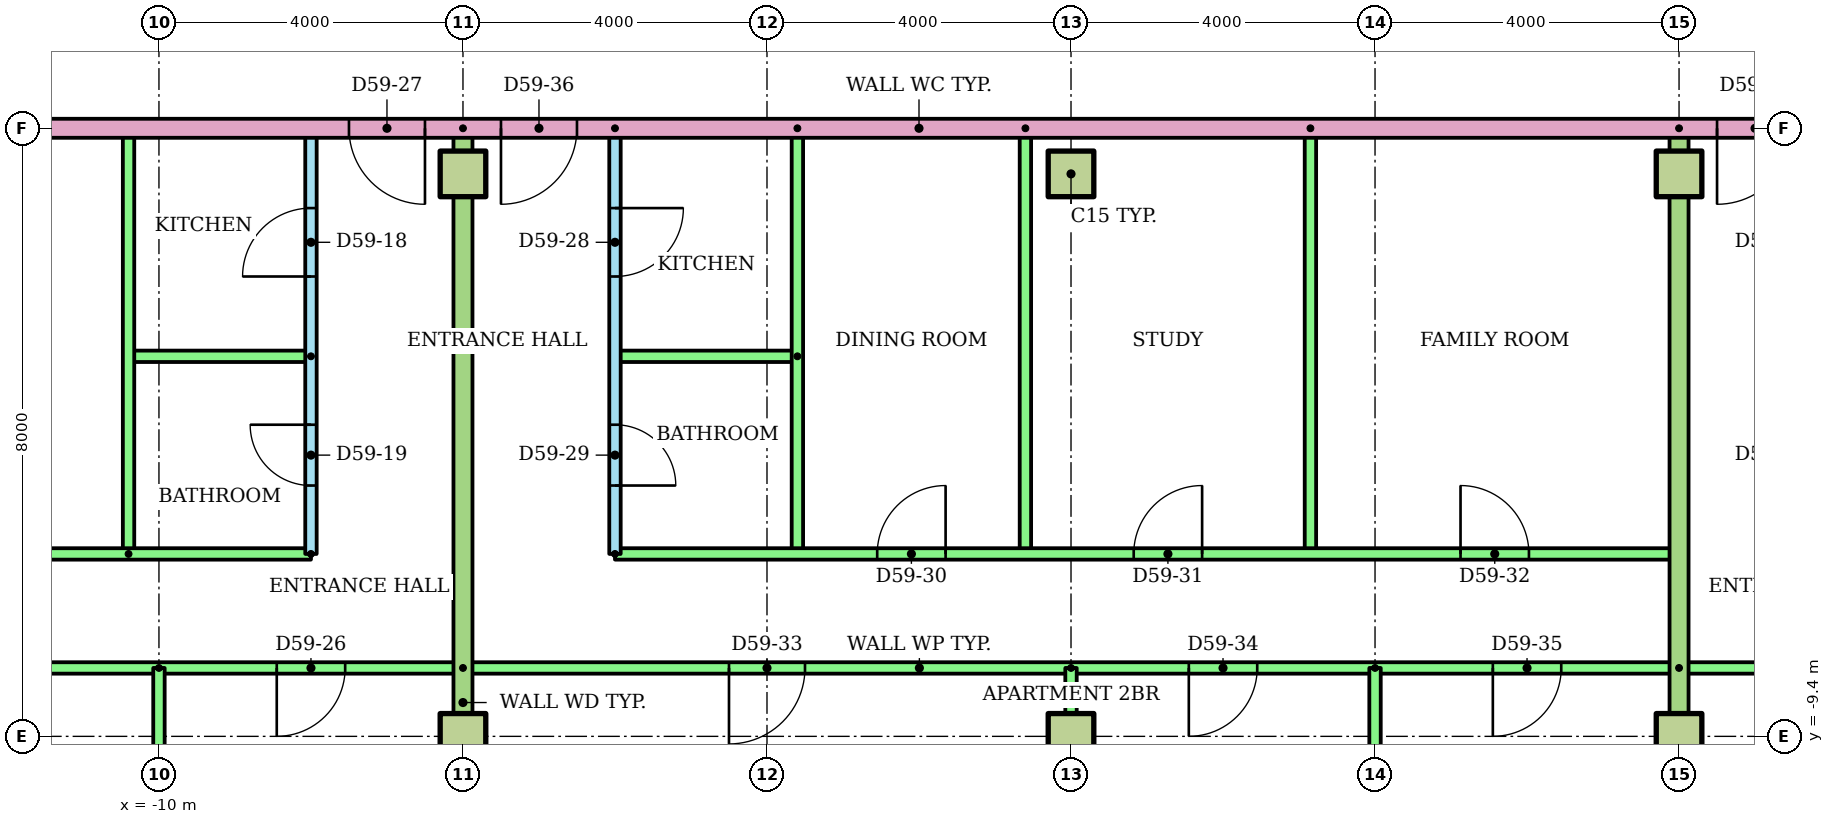
"""IFC4 building model, lengths in metres.
Left out: names, types, materials, properties, quantities, classifications, styles, units other than length and angle.
Written with IfcOpenShell. Run it as: python <this file> out.ifc"""

import sys

from ifc_helpers import new_model, si_unit, direction, frame, frame_2d, origin, origin_2d, place, context, subcontext, project, spatial, rectangle, extrude, element, fill, save


model = new_model("IFC4")
c1 = context("Model", 3, precision=1e-05, world=origin(), true_north=direction((0.0, 1.0)))
c2 = subcontext(c1, "Body", "Model", "MODEL_VIEW")
j1 = project(units=[si_unit("LENGTHUNIT", "METRE"), si_unit("PLANEANGLEUNIT", "RADIAN")], contexts=[c1])
p1 = place(None, origin())
s1 = spatial("IfcSite", under=j1, at=p1, CompositionType="ELEMENT")
p2 = place(p1, origin())
s2 = spatial("IfcBuilding", under=s1, at=p2, CompositionType="ELEMENT")
p3 = place(p2, frame((0.0, 0.0, 226.8)))
s3 = spatial("IfcBuildingStorey", under=s2, at=p3, CompositionType="ELEMENT", Elevation=226.8)
for number, where in (
    (1, (-6.0, -9.4, 0.0)),
    (2, (2.0, -9.4, 0.0)),
    (3, (10.0, -9.4, 0.0)),
    (4, (-6.0, -2.0, 0.0)),
    (5, (2.0, -2.0, 0.0)),
    (6, (10.0, -2.0, 0.0)),
):
    element("IfcColumn", number, at=place(p3, frame(where)), inside=s3, PredefinedType="COLUMN", context=c2, shape_type="SweptSolid", body=[
        extrude(rectangle(XDim=0.6, YDim=0.6, at=origin_2d()), origin(), (0.0, 0.0, 1.0), 3.2),
    ])
p4 = place(p3, frame((-8.0, -7.0, 0.0), z_axis=(0.0, 0.0, 1.0), x_axis=(0.0, 1.0, 0.0)))
e7 = element("IfcWall", 7, at=p4, inside=s3, PredefinedType="PARTITIONING", context=c2, shape_type="SweptSolid", body=[
    extrude(rectangle(XDim=5.6, YDim=0.15, at=frame_2d((2.8, 0.0))), origin(), (0.0, 0.0, 1.0), 2.4),
])
p5 = place(p4, frame((3.65, 0.0, 0.0)))
e8 = element("IfcOpeningElement", 8, at=p5, cuts=e7, PredefinedType="OPENING", context=c2, shape_type="SweptSolid", body=[
    extrude(rectangle(XDim=0.9, YDim=2.1, at=frame_2d((0.45, 1.05))), frame((0.0, 0.085, 0.0), z_axis=(0.0, -1.0, 0.0), x_axis=(1.0, 0.0, 0.0)), (0.0, 0.0, 1.0), 0.17),
])
p6 = place(p4, frame((0.9, 0.0, 0.0)))
e9 = element("IfcOpeningElement", 9, at=p6, cuts=e7, PredefinedType="OPENING", context=c2, shape_type="SweptSolid", body=[
    extrude(rectangle(XDim=0.8, YDim=2.1, at=frame_2d((0.4, 1.05))), frame((0.0, 0.085, 0.0), z_axis=(0.0, -1.0, 0.0), x_axis=(1.0, 0.0, 0.0)), (0.0, 0.0, 1.0), 0.17),
])
p7 = place(p3, frame((-8.0, -4.4, 0.0), z_axis=(0.0, 0.0, 1.0), x_axis=(-1.0, 0.0, 0.0)))
e10 = element("IfcWall", 10, at=p7, inside=s3, PredefinedType="PARTITIONING", context=c2, shape_type="SweptSolid", body=[
    extrude(rectangle(XDim=2.4, YDim=0.15, at=frame_2d((1.2, 0.0))), origin(), (0.0, 0.0, 1.0), 2.4),
])
p8 = place(p3, frame((-10.4, -7.0, 0.0), z_axis=(0.0, 0.0, 1.0), x_axis=(0.0, 1.0, 0.0)))
e11 = element("IfcWall", 11, at=p8, inside=s3, PredefinedType="PARTITIONING", context=c2, shape_type="SweptSolid", body=[
    extrude(rectangle(XDim=5.6, YDim=0.15, at=frame_2d((2.8, 0.0))), origin(), (0.0, 0.0, 1.0), 2.4),
])
p9 = place(p3, frame((-28.91, -7.0, 0.0)))
e12 = element("IfcWall", 12, at=p9, inside=s3, PredefinedType="PARTITIONING", context=c2, shape_type="SweptSolid", body=[
    extrude(rectangle(XDim=20.91, YDim=0.15, at=frame_2d((10.455, 0.0))), origin(), (0.0, 0.0, 1.0), 2.4),
])
p10 = place(p9, frame((15.81, 0.0, 0.0)))
e13 = element("IfcOpeningElement", 13, at=p10, cuts=e12, PredefinedType="OPENING", context=c2, shape_type="SweptSolid", body=[
    extrude(rectangle(XDim=0.9, YDim=2.1, at=frame_2d((0.45, 1.05))), frame((0.0, 0.085, 0.0), z_axis=(0.0, -1.0, 0.0), x_axis=(1.0, 0.0, 0.0)), (0.0, 0.0, 1.0), 0.17),
])
p11 = place(p9, frame((10.56, 0.0, 0.0)))
e14 = element("IfcOpeningElement", 14, at=p11, cuts=e12, PredefinedType="OPENING", context=c2, shape_type="SweptSolid", body=[
    extrude(rectangle(XDim=0.9, YDim=2.1, at=frame_2d((0.45, 1.05))), frame((0.0, 0.085, 0.0), z_axis=(0.0, -1.0, 0.0), x_axis=(1.0, 0.0, 0.0)), (0.0, 0.0, 1.0), 0.17),
])
p12 = place(p9, frame((3.66, 0.0, 0.0)))
e15 = element("IfcOpeningElement", 15, at=p12, cuts=e12, PredefinedType="OPENING", context=c2, shape_type="SweptSolid", body=[
    extrude(rectangle(XDim=0.9, YDim=2.1, at=frame_2d((0.45, 1.05))), frame((0.0, 0.085, 0.0), z_axis=(0.0, -1.0, 0.0), x_axis=(1.0, 0.0, 0.0)), (0.0, 0.0, 1.0), 0.17),
])
p13 = place(p3, frame((-6.0, -8.5, 0.0), z_axis=(0.0, 0.0, 1.0), x_axis=(-1.0, 0.0, 0.0)))
e16 = element("IfcWall", 16, at=p13, inside=s3, PredefinedType="PARTITIONING", context=c2, shape_type="SweptSolid", body=[
    extrude(rectangle(XDim=22.91, YDim=0.15, at=frame_2d((11.455, 0.0))), origin(), (0.0, 0.0, 1.0), 2.4),
])
p14 = place(p13, frame((20.0, 0.0, 0.0)))
e17 = element("IfcOpeningElement", 17, at=p14, cuts=e16, PredefinedType="OPENING", context=c2, shape_type="SweptSolid", body=[
    extrude(rectangle(XDim=0.9, YDim=2.1, at=frame_2d((0.45, 1.05))), frame((0.0, 0.085, 0.0), z_axis=(0.0, -1.0, 0.0), x_axis=(1.0, 0.0, 0.0)), (0.0, 0.0, 1.0), 0.17),
])
p15 = place(p13, frame((12.6, 0.0, 0.0)))
e18 = element("IfcOpeningElement", 18, at=p15, cuts=e16, PredefinedType="OPENING", context=c2, shape_type="SweptSolid", body=[
    extrude(rectangle(XDim=1.0, YDim=2.1, at=frame_2d((0.5, 1.05))), frame((0.0, 0.085, 0.0), z_axis=(0.0, -1.0, 0.0), x_axis=(1.0, 0.0, 0.0)), (0.0, 0.0, 1.0), 0.17),
])
p16 = place(p13, frame((5.55, 0.0, 0.0)))
e19 = element("IfcOpeningElement", 19, at=p16, cuts=e16, PredefinedType="OPENING", context=c2, shape_type="SweptSolid", body=[
    extrude(rectangle(XDim=0.9, YDim=2.1, at=frame_2d((0.45, 1.05))), frame((0.0, 0.085, 0.0), z_axis=(0.0, -1.0, 0.0), x_axis=(1.0, 0.0, 0.0)), (0.0, 0.0, 1.0), 0.17),
])
p17 = place(p13, frame((1.55, 0.0, 0.0)))
e20 = element("IfcOpeningElement", 20, at=p17, cuts=e16, PredefinedType="OPENING", context=c2, shape_type="SweptSolid", body=[
    extrude(rectangle(XDim=0.9, YDim=2.1, at=frame_2d((0.45, 1.05))), frame((0.0, 0.085, 0.0), z_axis=(0.0, -1.0, 0.0), x_axis=(1.0, 0.0, 0.0)), (0.0, 0.0, 1.0), 0.17),
])
p18 = place(p3, frame((-10.0, -8.5, 0.0), z_axis=(0.0, 0.0, 1.0), x_axis=(0.0, -1.0, 0.0)))
e21 = element("IfcWall", 21, at=p18, inside=s3, PredefinedType="PARTITIONING", context=c2, shape_type="SweptSolid", body=[
    extrude(rectangle(XDim=8.021, YDim=0.15, at=frame_2d((4.01, 0.0))), origin(), (0.0, 0.0, 1.0), 2.4),
])
p19 = place(p3, frame((-4.0, -1.4, 0.0), z_axis=(0.0, 0.0, 1.0), x_axis=(0.0, -1.0, 0.0)))
e22 = element("IfcWall", 22, at=p19, inside=s3, PredefinedType="PARTITIONING", context=c2, shape_type="SweptSolid", body=[
    extrude(rectangle(XDim=5.6, YDim=0.15, at=frame_2d((2.8, 0.0))), origin(), (0.0, 0.0, 1.0), 2.4),
])
p20 = place(p19, frame((1.05, 0.0, 0.0)))
e23 = element("IfcOpeningElement", 23, at=p20, cuts=e22, PredefinedType="OPENING", context=c2, shape_type="SweptSolid", body=[
    extrude(rectangle(XDim=0.9, YDim=2.1, at=frame_2d((0.45, 1.05))), frame((0.0, 0.085, 0.0), z_axis=(0.0, -1.0, 0.0), x_axis=(1.0, 0.0, 0.0)), (0.0, 0.0, 1.0), 0.17),
])
p21 = place(p19, frame((3.9, 0.0, 0.0)))
e24 = element("IfcOpeningElement", 24, at=p21, cuts=e22, PredefinedType="OPENING", context=c2, shape_type="SweptSolid", body=[
    extrude(rectangle(XDim=0.8, YDim=2.1, at=frame_2d((0.4, 1.05))), frame((0.0, 0.085, 0.0), z_axis=(0.0, -1.0, 0.0), x_axis=(1.0, 0.0, 0.0)), (0.0, 0.0, 1.0), 0.17),
])
p22 = place(p3, frame((-1.6, -4.4, 0.0), z_axis=(0.0, 0.0, 1.0), x_axis=(-1.0, 0.0, 0.0)))
e25 = element("IfcWall", 25, at=p22, inside=s3, PredefinedType="PARTITIONING", context=c2, shape_type="SweptSolid", body=[
    extrude(rectangle(XDim=2.4, YDim=0.15, at=frame_2d((1.2, 0.0))), origin(), (0.0, 0.0, 1.0), 2.4),
])
for number, where, z_axis, x_axis in (
    (26, (-1.6, -1.4, 0.0), (0.0, 0.0, 1.0), (0.0, -1.0, 0.0)),
    (27, (1.4, -1.4, 0.0), (0.0, 0.0, 1.0), (0.0, -1.0, 0.0)),
    (28, (5.15, -1.4, 0.0), (0.0, 0.0, 1.0), (0.0, -1.0, 0.0)),
):
    element("IfcWall", number, at=place(p3, frame(where, z_axis=z_axis, x_axis=x_axis)), inside=s3, PredefinedType="PARTITIONING", context=c2, shape_type="SweptSolid", body=[
        extrude(rectangle(XDim=5.6, YDim=0.15, at=frame_2d((2.8, 0.0))), origin(), (0.0, 0.0, 1.0), 2.4),
    ])
p23 = place(p3, frame((-4.0, -7.0, 0.0)))
e29 = element("IfcWall", 29, at=p23, inside=s3, PredefinedType="PARTITIONING", context=c2, shape_type="SweptSolid", body=[
    extrude(rectangle(XDim=14.0, YDim=0.15, at=frame_2d((7.0, 0.0))), origin(), (0.0, 0.0, 1.0), 2.4),
])
p24 = place(p23, frame((3.45, 0.0, 0.0)))
e30 = element("IfcOpeningElement", 30, at=p24, cuts=e29, PredefinedType="OPENING", context=c2, shape_type="SweptSolid", body=[
    extrude(rectangle(XDim=0.9, YDim=2.1, at=frame_2d((0.45, 1.05))), frame((0.0, 0.085, 0.0), z_axis=(0.0, -1.0, 0.0), x_axis=(1.0, 0.0, 0.0)), (0.0, 0.0, 1.0), 0.17),
])
p25 = place(p23, frame((6.825, 0.0, 0.0)))
e31 = element("IfcOpeningElement", 31, at=p25, cuts=e29, PredefinedType="OPENING", context=c2, shape_type="SweptSolid", body=[
    extrude(rectangle(XDim=0.9, YDim=2.1, at=frame_2d((0.45, 1.05))), frame((0.0, 0.085, 0.0), z_axis=(0.0, -1.0, 0.0), x_axis=(1.0, 0.0, 0.0)), (0.0, 0.0, 1.0), 0.17),
])
p26 = place(p23, frame((11.125, 0.0, 0.0)))
e32 = element("IfcOpeningElement", 32, at=p26, cuts=e29, PredefinedType="OPENING", context=c2, shape_type="SweptSolid", body=[
    extrude(rectangle(XDim=0.9, YDim=2.1, at=frame_2d((0.45, 1.05))), frame((0.0, 0.085, 0.0), z_axis=(0.0, -1.0, 0.0), x_axis=(1.0, 0.0, 0.0)), (0.0, 0.0, 1.0), 0.17),
])
p27 = place(p3, frame((10.0, -8.5, 0.0), z_axis=(0.0, 0.0, 1.0), x_axis=(-1.0, 0.0, 0.0)))
e33 = element("IfcWall", 33, at=p27, inside=s3, PredefinedType="PARTITIONING", context=c2, shape_type="SweptSolid", body=[
    extrude(rectangle(XDim=16.0, YDim=0.15, at=frame_2d((8.0, 0.0))), origin(), (0.0, 0.0, 1.0), 2.4),
])
p28 = place(p27, frame((11.5, 0.0, 0.0)))
e34 = element("IfcOpeningElement", 34, at=p28, cuts=e33, PredefinedType="OPENING", context=c2, shape_type="SweptSolid", body=[
    extrude(rectangle(XDim=1.0, YDim=2.1, at=frame_2d((0.5, 1.05))), frame((0.0, 0.085, 0.0), z_axis=(0.0, -1.0, 0.0), x_axis=(1.0, 0.0, 0.0)), (0.0, 0.0, 1.0), 0.17),
])
p29 = place(p27, frame((5.55, 0.0, 0.0)))
e35 = element("IfcOpeningElement", 35, at=p29, cuts=e33, PredefinedType="OPENING", context=c2, shape_type="SweptSolid", body=[
    extrude(rectangle(XDim=0.9, YDim=2.1, at=frame_2d((0.45, 1.05))), frame((0.0, 0.085, 0.0), z_axis=(0.0, -1.0, 0.0), x_axis=(1.0, 0.0, 0.0)), (0.0, 0.0, 1.0), 0.17),
])
p30 = place(p27, frame((1.55, 0.0, 0.0)))
e36 = element("IfcOpeningElement", 36, at=p30, cuts=e33, PredefinedType="OPENING", context=c2, shape_type="SweptSolid", body=[
    extrude(rectangle(XDim=0.9, YDim=2.1, at=frame_2d((0.45, 1.05))), frame((0.0, 0.085, 0.0), z_axis=(0.0, -1.0, 0.0), x_axis=(1.0, 0.0, 0.0)), (0.0, 0.0, 1.0), 0.17),
])
p31 = place(p3, frame((2.0, -8.5, 0.0), z_axis=(0.0, 0.0, 1.0), x_axis=(0.0, -1.0, 0.0)))
e37 = element("IfcWall", 37, at=p31, inside=s3, PredefinedType="PARTITIONING", context=c2, shape_type="SweptSolid", body=[
    extrude(rectangle(XDim=8.01, YDim=0.15, at=frame_2d((4.005, 0.0))), origin(), (0.0, 0.0, 1.0), 2.4),
])
p32 = place(p3, frame((6.0, -8.5, 0.0), z_axis=(0.0, 0.0, 1.0), x_axis=(0.0, -1.0, 0.0)))
e38 = element("IfcWall", 38, at=p32, inside=s3, PredefinedType="PARTITIONING", context=c2, shape_type="SweptSolid", body=[
    extrude(rectangle(XDim=8.021, YDim=0.15, at=frame_2d((4.01, 0.0))), origin(), (0.0, 0.0, 1.0), 2.4),
])
p33 = place(p3, frame((-6.0, -1.4, 0.0), z_axis=(0.0, 0.0, 1.0), x_axis=(0.0, -1.0, 0.0)))
e39 = element("IfcWall", 39, at=p33, inside=s3, PredefinedType="PARTITIONING", context=c2, shape_type="SweptSolid", body=[
    extrude(rectangle(XDim=15.11, YDim=0.25, at=frame_2d((7.555, 0.0))), origin(), (0.0, 0.0, 1.0), 2.4),
])
p34 = place(p3, frame((28.92, -8.5, 0.0), z_axis=(0.0, 0.0, 1.0), x_axis=(-1.0, 0.0, 0.0)))
e40 = element("IfcWall", 40, at=p34, inside=s3, PredefinedType="PARTITIONING", context=c2, shape_type="SweptSolid", body=[
    extrude(rectangle(XDim=18.92, YDim=0.15, at=frame_2d((9.46, 0.0))), origin(), (0.0, 0.0, 1.0), 2.4),
])
p35 = place(p34, frame((16.47, 0.0, 0.0)))
e41 = element("IfcOpeningElement", 41, at=p35, cuts=e40, PredefinedType="OPENING", context=c2, shape_type="SweptSolid", body=[
    extrude(rectangle(XDim=0.9, YDim=2.1, at=frame_2d((0.45, 1.05))), frame((0.0, 0.085, 0.0), z_axis=(0.0, -1.0, 0.0), x_axis=(1.0, 0.0, 0.0)), (0.0, 0.0, 1.0), 0.17),
])
p36 = place(p34, frame((9.32, 0.0, 0.0)))
e42 = element("IfcOpeningElement", 42, at=p36, cuts=e40, PredefinedType="OPENING", context=c2, shape_type="SweptSolid", body=[
    extrude(rectangle(XDim=1.0, YDim=2.1, at=frame_2d((0.5, 1.05))), frame((0.0, 0.085, 0.0), z_axis=(0.0, -1.0, 0.0), x_axis=(1.0, 0.0, 0.0)), (0.0, 0.0, 1.0), 0.17),
])
p37 = place(p34, frame((1.544, 0.0, 0.0)))
e43 = element("IfcOpeningElement", 43, at=p37, cuts=e40, PredefinedType="OPENING", context=c2, shape_type="SweptSolid", body=[
    extrude(rectangle(XDim=0.9, YDim=2.1, at=frame_2d((0.45, 1.05))), frame((0.0, 0.085, 0.0), z_axis=(0.0, -1.0, 0.0), x_axis=(1.0, 0.0, 0.0)), (0.0, 0.0, 1.0), 0.17),
])
p38 = place(p3, frame((10.0, -1.4, 0.0), z_axis=(0.0, 0.0, 1.0), x_axis=(0.0, -1.0, 0.0)))
e44 = element("IfcWall", 44, at=p38, inside=s3, PredefinedType="PARTITIONING", context=c2, shape_type="SweptSolid", body=[
    extrude(rectangle(XDim=15.11, YDim=0.25, at=frame_2d((7.555, 0.0))), origin(), (0.0, 0.0, 1.0), 2.4),
])
p39 = place(p3, frame((14.0, -1.4, 0.0), z_axis=(0.0, 0.0, 1.0), x_axis=(-1.0, 0.0, 0.0)))
e45 = element("IfcWall", 45, at=p39, inside=s3, PredefinedType="PARTITIONING", context=c2, shape_type="SweptSolid", body=[
    extrude(rectangle(XDim=28.0, YDim=0.25, at=frame_2d((14.0, 0.0))), origin(), (0.0, 0.0, 1.0), 2.4),
])
p40 = place(p39, frame((20.5, 0.0, 0.0)))
e46 = element("IfcOpeningElement", 46, at=p40, cuts=e45, PredefinedType="OPENING", context=c2, shape_type="SweptSolid", body=[
    extrude(rectangle(XDim=1.0, YDim=2.1, at=frame_2d((0.5, 1.05))), frame((0.0, 0.135, 0.0), z_axis=(0.0, -1.0, 0.0), x_axis=(1.0, 0.0, 0.0)), (0.0, 0.0, 1.0), 0.27),
])
p41 = place(p39, frame((18.5, 0.0, 0.0)))
e47 = element("IfcOpeningElement", 47, at=p41, cuts=e45, PredefinedType="OPENING", context=c2, shape_type="SweptSolid", body=[
    extrude(rectangle(XDim=1.0, YDim=2.1, at=frame_2d((0.5, 1.05))), frame((0.0, 0.135, 0.0), z_axis=(0.0, -1.0, 0.0), x_axis=(1.0, 0.0, 0.0)), (0.0, 0.0, 1.0), 0.27),
])
p42 = place(p39, frame((2.5, 0.0, 0.0)))
e48 = element("IfcOpeningElement", 48, at=p42, cuts=e45, PredefinedType="OPENING", context=c2, shape_type="SweptSolid", body=[
    extrude(rectangle(XDim=1.0, YDim=2.1, at=frame_2d((0.5, 1.05))), frame((0.0, 0.135, 0.0), z_axis=(0.0, -1.0, 0.0), x_axis=(1.0, 0.0, 0.0)), (0.0, 0.0, 1.0), 0.27),
])
p43 = place(p5, origin())
e49 = element("IfcDoor", 49, at=p43, inside=s3, OperationType="SINGLE_SWING_LEFT", PredefinedType="DOOR", context=c2, shape_type="SweptSolid", body=[
    extrude(rectangle(XDim=0.9, YDim=2.1, at=frame_2d((0.45, 1.05))), frame((0.0, 0.025, 0.0), z_axis=(0.0, -1.0, 0.0), x_axis=(1.0, 0.0, 0.0)), (0.0, 0.0, 1.0), 0.05),
])
fill(e8, e49)
p44 = place(p6, origin())
e50 = element("IfcDoor", 50, at=p44, inside=s3, OperationType="SINGLE_SWING_RIGHT", PredefinedType="DOOR", context=c2, shape_type="SweptSolid", body=[
    extrude(rectangle(XDim=0.8, YDim=2.1, at=frame_2d((0.4, 1.05))), frame((0.0, 0.025, 0.0), z_axis=(0.0, -1.0, 0.0), x_axis=(1.0, 0.0, 0.0)), (0.0, 0.0, 1.0), 0.05),
])
fill(e9, e50)
p45 = place(p17, origin())
e51 = element("IfcDoor", 51, at=p45, inside=s3, OperationType="SINGLE_SWING_RIGHT", PredefinedType="DOOR", context=c2, shape_type="SweptSolid", body=[
    extrude(rectangle(XDim=0.9, YDim=2.1, at=frame_2d((0.45, 1.05))), frame((0.0, 0.025, 0.0), z_axis=(0.0, -1.0, 0.0), x_axis=(1.0, 0.0, 0.0)), (0.0, 0.0, 1.0), 0.05),
])
fill(e20, e51)
p46 = place(p40, origin())
e52 = element("IfcDoor", 52, at=p46, inside=s3, OperationType="SINGLE_SWING_LEFT", PredefinedType="DOOR", context=c2, shape_type="SweptSolid", body=[
    extrude(rectangle(XDim=1.0, YDim=2.1, at=frame_2d((0.5, 1.05))), frame((0.0, 0.025, 0.0), z_axis=(0.0, -1.0, 0.0), x_axis=(1.0, 0.0, 0.0)), (0.0, 0.0, 1.0), 0.05),
])
fill(e46, e52)
p47 = place(p20, origin())
e53 = element("IfcDoor", 53, at=p47, inside=s3, OperationType="SINGLE_SWING_LEFT", PredefinedType="DOOR", context=c2, shape_type="SweptSolid", body=[
    extrude(rectangle(XDim=0.9, YDim=2.1, at=frame_2d((0.45, 1.05))), frame((0.0, 0.025, 0.0), z_axis=(0.0, -1.0, 0.0), x_axis=(1.0, 0.0, 0.0)), (0.0, 0.0, 1.0), 0.05),
])
fill(e23, e53)
p48 = place(p21, origin())
e54 = element("IfcDoor", 54, at=p48, inside=s3, OperationType="SINGLE_SWING_RIGHT", PredefinedType="DOOR", context=c2, shape_type="SweptSolid", body=[
    extrude(rectangle(XDim=0.8, YDim=2.1, at=frame_2d((0.4, 1.05))), frame((0.0, 0.025, 0.0), z_axis=(0.0, -1.0, 0.0), x_axis=(1.0, 0.0, 0.0)), (0.0, 0.0, 1.0), 0.05),
])
fill(e24, e54)
p49 = place(p24, origin())
e55 = element("IfcDoor", 55, at=p49, inside=s3, OperationType="SINGLE_SWING_RIGHT", PredefinedType="DOOR", context=c2, shape_type="SweptSolid", body=[
    extrude(rectangle(XDim=0.9, YDim=2.1, at=frame_2d((0.45, 1.05))), frame((0.0, 0.025, 0.0), z_axis=(0.0, -1.0, 0.0), x_axis=(1.0, 0.0, 0.0)), (0.0, 0.0, 1.0), 0.05),
])
fill(e30, e55)
p50 = place(p25, origin())
e56 = element("IfcDoor", 56, at=p50, inside=s3, OperationType="SINGLE_SWING_RIGHT", PredefinedType="DOOR", context=c2, shape_type="SweptSolid", body=[
    extrude(rectangle(XDim=0.9, YDim=2.1, at=frame_2d((0.45, 1.05))), frame((0.0, 0.025, 0.0), z_axis=(0.0, -1.0, 0.0), x_axis=(1.0, 0.0, 0.0)), (0.0, 0.0, 1.0), 0.05),
])
fill(e31, e56)
p51 = place(p26, origin())
e57 = element("IfcDoor", 57, at=p51, inside=s3, OperationType="SINGLE_SWING_LEFT", PredefinedType="DOOR", context=c2, shape_type="SweptSolid", body=[
    extrude(rectangle(XDim=0.9, YDim=2.1, at=frame_2d((0.45, 1.05))), frame((0.0, 0.025, 0.0), z_axis=(0.0, -1.0, 0.0), x_axis=(1.0, 0.0, 0.0)), (0.0, 0.0, 1.0), 0.05),
])
fill(e32, e57)
p52 = place(p28, origin())
e58 = element("IfcDoor", 58, at=p52, inside=s3, OperationType="SINGLE_SWING_RIGHT", PredefinedType="DOOR", context=c2, shape_type="SweptSolid", body=[
    extrude(rectangle(XDim=1.0, YDim=2.1, at=frame_2d((0.5, 1.05))), frame((0.0, 0.025, 0.0), z_axis=(0.0, -1.0, 0.0), x_axis=(1.0, 0.0, 0.0)), (0.0, 0.0, 1.0), 0.05),
])
fill(e34, e58)
p53 = place(p29, origin())
e59 = element("IfcDoor", 59, at=p53, inside=s3, OperationType="SINGLE_SWING_RIGHT", PredefinedType="DOOR", context=c2, shape_type="SweptSolid", body=[
    extrude(rectangle(XDim=0.9, YDim=2.1, at=frame_2d((0.45, 1.05))), frame((0.0, 0.025, 0.0), z_axis=(0.0, -1.0, 0.0), x_axis=(1.0, 0.0, 0.0)), (0.0, 0.0, 1.0), 0.05),
])
fill(e35, e59)
p54 = place(p30, origin())
e60 = element("IfcDoor", 60, at=p54, inside=s3, OperationType="SINGLE_SWING_RIGHT", PredefinedType="DOOR", context=c2, shape_type="SweptSolid", body=[
    extrude(rectangle(XDim=0.9, YDim=2.1, at=frame_2d((0.45, 1.05))), frame((0.0, 0.025, 0.0), z_axis=(0.0, -1.0, 0.0), x_axis=(1.0, 0.0, 0.0)), (0.0, 0.0, 1.0), 0.05),
])
fill(e36, e60)
p55 = place(p41, origin())
e61 = element("IfcDoor", 61, at=p55, inside=s3, OperationType="SINGLE_SWING_RIGHT", PredefinedType="DOOR", context=c2, shape_type="SweptSolid", body=[
    extrude(rectangle(XDim=1.0, YDim=2.1, at=frame_2d((0.5, 1.05))), frame((0.0, 0.025, 0.0), z_axis=(0.0, -1.0, 0.0), x_axis=(1.0, 0.0, 0.0)), (0.0, 0.0, 1.0), 0.05),
])
fill(e47, e61)
p56 = place(p42, origin())
e62 = element("IfcDoor", 62, at=p56, inside=s3, OperationType="SINGLE_SWING_RIGHT", PredefinedType="DOOR", context=c2, shape_type="SweptSolid", body=[
    extrude(rectangle(XDim=1.0, YDim=2.1, at=frame_2d((0.5, 1.05))), frame((0.0, 0.025, 0.0), z_axis=(0.0, -1.0, 0.0), x_axis=(1.0, 0.0, 0.0)), (0.0, 0.0, 1.0), 0.05),
])
fill(e48, e62)
save(model, sys.argv[1])
